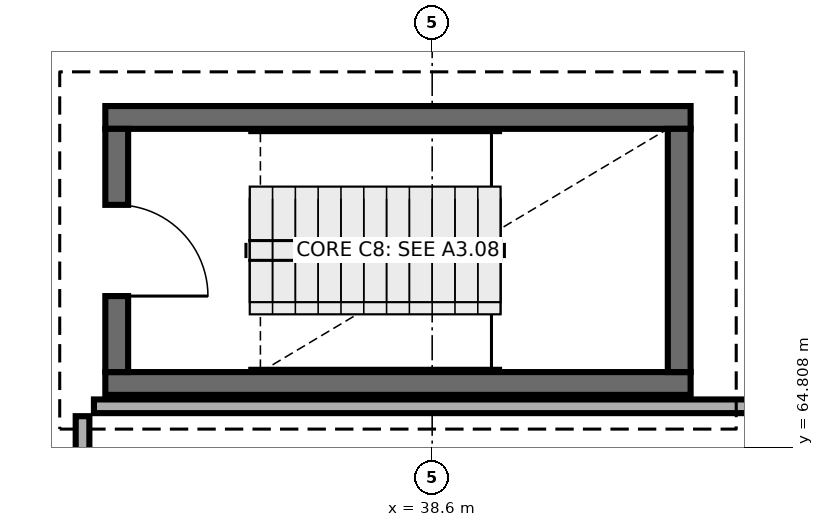
"""IFC4 building model, lengths in metres.
Left out: names, types, materials, properties, quantities, classifications, styles, units other than length and angle.
Written with IfcOpenShell. Run it as: python <this file> out.ifc"""

import sys

from ifc_helpers import new_model, si_unit, direction, frame, frame_2d, origin, place, context, subcontext, project, spatial, rectangle, extrude, element, fill, save


model = new_model("IFC4")
c1 = context("Model", 3, precision=1e-05, world=origin(), true_north=direction((0.0, 1.0)))
c2 = subcontext(c1, "Body", "Model", "MODEL_VIEW")
j1 = project(units=[si_unit("LENGTHUNIT", "METRE"), si_unit("PLANEANGLEUNIT", "RADIAN")], contexts=[c1])
p1 = place(None, origin())
s1 = spatial("IfcSite", under=j1, at=p1, CompositionType="ELEMENT")
p2 = place(p1, origin())
s2 = spatial("IfcBuilding", under=s1, at=p2, CompositionType="ELEMENT")
p3 = place(p2, frame((0.0, 0.0, 13.8)))
s3 = spatial("IfcBuildingStorey", under=s2, at=p3, CompositionType="ELEMENT", Elevation=13.8)
for number, where, z_axis, x_axis in (
    (1, (34.3, 65.65, 0.0), (0.0, 0.0, 1.0), (1.0, 0.0, 0.0)),
    (2, (42.0, 69.15, 0.0), (0.0, 0.0, 1.0), (-1.0, 0.0, 0.0)),
):
    element("IfcWall", number, at=place(p3, frame(where, z_axis=z_axis, x_axis=x_axis)), inside=s3, PredefinedType="SHEAR", context=c2, shape_type="SweptSolid", body=[
        extrude(rectangle(XDim=7.7, YDim=0.3, at=frame_2d((3.85, 0.0))), origin(), (0.0, 0.0, 1.0), 4.5),
    ])
p4 = place(p3, frame((34.45, 69.0, 0.0), z_axis=(0.0, 0.0, 1.0), x_axis=(0.0, -1.0, 0.0)))
e3 = element("IfcWall", 3, at=p4, inside=s3, PredefinedType="SHEAR", context=c2, shape_type="SweptSolid", body=[
    extrude(rectangle(XDim=3.2, YDim=0.3, at=frame_2d((1.6, 0.0))), origin(), (0.0, 0.0, 1.0), 4.5),
])
p5 = place(p4, frame((1.0, 0.0, 0.0)))
e4 = element("IfcOpeningElement", 4, at=p5, cuts=e3, PredefinedType="OPENING", context=c2, shape_type="SweptSolid", body=[
    extrude(rectangle(XDim=1.2, YDim=2.15, at=frame_2d((0.6, 1.075))), frame((0.0, 0.16, 0.0), z_axis=(0.0, -1.0, 0.0), x_axis=(1.0, 0.0, 0.0)), (0.0, 0.0, 1.0), 0.32),
])
p6 = place(p3, frame((41.85, 65.8, 0.0), z_axis=(0.0, 0.0, 1.0), x_axis=(0.0, 1.0, 0.0)))
e5 = element("IfcWall", 5, at=p6, inside=s3, PredefinedType="SHEAR", context=c2, shape_type="SweptSolid", body=[
    extrude(rectangle(XDim=3.2, YDim=0.3, at=frame_2d((1.6, 0.0))), origin(), (0.0, 0.0, 1.0), 4.5),
])
p7 = place(p3, frame((34.15, 65.35, 0.0), z_axis=(0.0, 0.0, 1.0), x_axis=(1.0, 0.0, 0.0)))
e6 = element("IfcWall", 6, at=p7, inside=s3, PredefinedType="PARTITIONING", context=c2, shape_type="SweptSolid", body=[
    extrude(rectangle(XDim=12.965, YDim=0.18, at=frame_2d((6.482, 0.0))), origin(), (0.0, 0.0, 1.0), 4.25),
])
p8 = place(p3, frame((34.0, 61.75, 0.0), z_axis=(0.0, 0.0, 1.0), x_axis=(0.0, 1.0, 0.0)))
e7 = element("IfcWall", 7, at=p8, inside=s3, PredefinedType="PARTITIONING", context=c2, shape_type="SweptSolid", body=[
    extrude(rectangle(XDim=3.47, YDim=0.18, at=frame_2d((1.735, 0.0))), origin(), (0.0, 0.0, 1.0), 4.25),
])
p9 = place(p8, frame((1.285, 0.0, 0.0)))
e8 = element("IfcOpeningElement", 8, at=p9, cuts=e7, PredefinedType="OPENING", context=c2, shape_type="SweptSolid", body=[
    extrude(rectangle(XDim=0.9, YDim=2.1, at=frame_2d((0.45, 1.05))), frame((0.0, 0.1, 0.0), z_axis=(0.0, -1.0, 0.0), x_axis=(1.0, 0.0, 0.0)), (0.0, 0.0, 1.0), 0.2),
])
p10 = place(p5, origin())
e9 = element("IfcDoor", 9, at=p10, inside=s3, OperationType="SINGLE_SWING_RIGHT", PredefinedType="DOOR", context=c2, shape_type="SweptSolid", body=[
    extrude(rectangle(XDim=1.2, YDim=2.15, at=frame_2d((0.6, 1.075))), frame((0.0, 0.025, 0.0), z_axis=(0.0, -1.0, 0.0), x_axis=(1.0, 0.0, 0.0)), (0.0, 0.0, 1.0), 0.05),
])
fill(e4, e9)
save(model, sys.argv[1])
